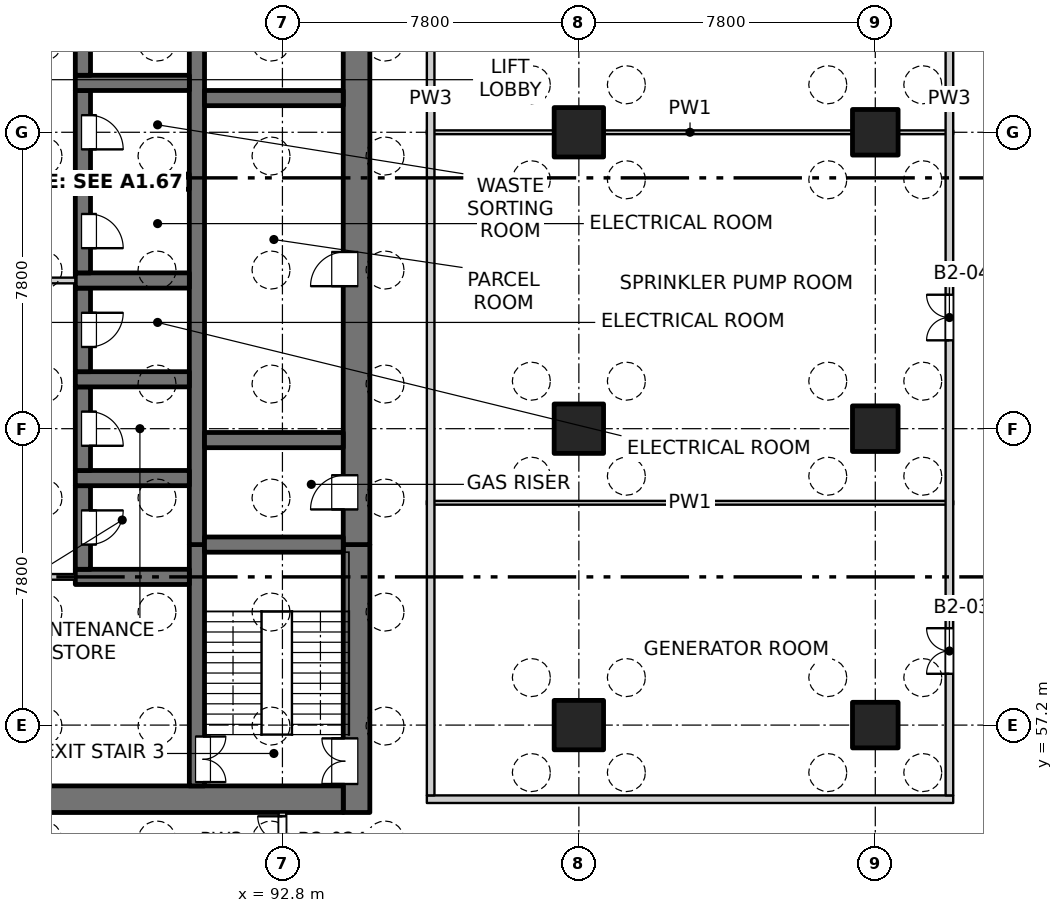
"""IFC4 building model, lengths in metres.
Left out: names, types, materials, properties, quantities, classifications, styles, units other than length and angle.
Written with IfcOpenShell. Run it as: python <this file> out.ifc"""

import sys

from ifc_helpers import new_model, si_unit, direction, frame, frame_2d, origin, origin_2d, place, context, subcontext, project, spatial, rectangle, extrude, element, fill, save


model = new_model("IFC4")
c1 = context("Model", 3, precision=1e-05, world=origin(), true_north=direction((0.0, 1.0)))
c2 = subcontext(c1, "Body", "Model", "MODEL_VIEW")
j1 = project(units=[si_unit("LENGTHUNIT", "METRE"), si_unit("PLANEANGLEUNIT", "RADIAN")], contexts=[c1])
p1 = place(None, origin())
s1 = spatial("IfcSite", under=j1, at=p1, CompositionType="ELEMENT")
p2 = place(p1, origin())
s2 = spatial("IfcBuilding", under=s1, at=p2, CompositionType="ELEMENT")
p3 = place(p2, frame((0.0, 0.0, -9.0)))
s3 = spatial("IfcBuildingStorey", under=s2, at=p3, CompositionType="ELEMENT", Elevation=-9.0)
for number, where, z_axis, x_axis in (
    (1, (108.4, 57.2, -0.5), (0.0, 0.0, 1.0), (1.0, 0.0, 0.0)),
    (2, (108.4, 65.0, -0.5), (0.0, 0.0, 1.0), (1.0, 0.0, 0.0)),
    (3, (108.4, 72.8, -0.5), (0.0, 0.0, 1.0), (1.0, 0.0, 0.0)),
):
    element("IfcColumn", number, at=place(p3, frame(where, z_axis=z_axis, x_axis=x_axis)), inside=s3, PredefinedType="COLUMN", context=c2, shape_type="SweptSolid", body=[
        extrude(rectangle(XDim=1.2, YDim=1.2, at=origin_2d()), origin(), (0.0, 0.0, 1.0), 4.65),
    ])
for number, where, z_axis, x_axis in (
    (4, (100.6, 57.2, -0.5), (0.0, 0.0, 1.0), (1.0, 0.0, 0.0)),
    (5, (100.6, 65.0, -0.5), (0.0, 0.0, 1.0), (1.0, 0.0, 0.0)),
    (6, (100.6, 72.8, -0.5), (0.0, 0.0, 1.0), (1.0, 0.0, 0.0)),
):
    element("IfcColumn", number, at=place(p3, frame(where, z_axis=z_axis, x_axis=x_axis)), inside=s3, PredefinedType="COLUMN", context=c2, shape_type="SweptSolid", body=[
        extrude(rectangle(XDim=1.3, YDim=1.3, at=origin_2d()), origin(), (0.0, 0.0, 1.0), 4.65),
    ])
p4 = place(p3, frame((94.75, 54.9, -0.5), z_axis=(0.0, 0.0, 1.0), x_axis=(0.0, 1.0, 0.0)))
e7 = element("IfcWall", 7, at=p4, inside=s3, PredefinedType="SOLIDWALL", context=c2, shape_type="SweptSolid", body=[
    extrude(rectangle(XDim=7.05, YDim=0.7, at=frame_2d((3.525, 0.0))), origin(), (0.0, 0.0, 1.0), 4.65),
])
p5 = place(p4, frame((0.75, 0.0, 0.5)))
e8 = element("IfcOpeningElement", 8, at=p5, cuts=e7, PredefinedType="OPENING", context=c2, shape_type="SweptSolid", body=[
    extrude(rectangle(XDim=1.2, YDim=2.1, at=frame_2d((0.6, 1.05))), frame((0.0, 0.36, 0.0), z_axis=(0.0, -1.0, 0.0), x_axis=(1.0, 0.0, 0.0)), (0.0, 0.0, 1.0), 0.72),
])
p6 = place(p3, frame((94.75, 61.95, -0.5), z_axis=(0.0, 0.0, 1.0), x_axis=(0.0, 1.0, 0.0)))
e9 = element("IfcWall", 9, at=p6, inside=s3, PredefinedType="SOLIDWALL", context=c2, shape_type="SweptSolid", body=[
    extrude(rectangle(XDim=15.35, YDim=0.7, at=frame_2d((7.675, 0.0))), origin(), (0.0, 0.0, 1.0), 4.65),
])
p7 = place(p6, frame((0.925, 0.0, 0.5)))
e10 = element("IfcOpeningElement", 10, at=p7, cuts=e9, PredefinedType="OPENING", context=c2, shape_type="SweptSolid", body=[
    extrude(rectangle(XDim=0.9, YDim=2.1, at=frame_2d((0.45, 1.05))), frame((0.0, 0.36, 0.0), z_axis=(0.0, -1.0, 0.0), x_axis=(1.0, 0.0, 0.0)), (0.0, 0.0, 1.0), 0.72),
])
p8 = place(p6, frame((6.8, 0.0, 0.5)))
e11 = element("IfcOpeningElement", 11, at=p8, cuts=e9, PredefinedType="OPENING", context=c2, shape_type="SweptSolid", body=[
    extrude(rectangle(XDim=0.9, YDim=2.1, at=frame_2d((0.45, 1.05))), frame((0.0, 0.36, 0.0), z_axis=(0.0, -1.0, 0.0), x_axis=(1.0, 0.0, 0.0)), (0.0, 0.0, 1.0), 0.72),
])
p9 = place(p6, frame((13.1, 0.0, 0.5)))
e12 = element("IfcOpeningElement", 12, at=p9, cuts=e9, PredefinedType="OPENING", context=c2, shape_type="SweptSolid", body=[
    extrude(rectangle(XDim=0.9, YDim=2.1, at=frame_2d((0.45, 1.05))), frame((0.0, 0.36, 0.0), z_axis=(0.0, -1.0, 0.0), x_axis=(1.0, 0.0, 0.0)), (0.0, 0.0, 1.0), 0.72),
])
p10 = place(p3, frame((75.6, 55.25, -0.5), z_axis=(0.0, 0.0, 1.0), x_axis=(1.0, 0.0, 0.0)))
e13 = element("IfcWall", 13, at=p10, inside=s3, PredefinedType="SOLIDWALL", context=c2, shape_type="SweptSolid", body=[
    extrude(rectangle(XDim=18.8, YDim=0.7, at=frame_2d((9.4, 0.0))), origin(), (0.0, 0.0, 1.0), 4.65),
])
p11 = place(p10, frame((8.65, 0.0, 0.5)))
e14 = element("IfcOpeningElement", 14, at=p11, cuts=e13, PredefinedType="OPENING", context=c2, shape_type="SweptSolid", body=[
    extrude(rectangle(XDim=1.5, YDim=2.1, at=frame_2d((0.75, 1.05))), frame((0.0, 0.36, 0.0), z_axis=(0.0, -1.0, 0.0), x_axis=(1.0, 0.0, 0.0)), (0.0, 0.0, 1.0), 0.72),
])
p12 = place(p3, frame((90.55, 55.6, -0.5), z_axis=(0.0, 0.0, 1.0), x_axis=(0.0, 1.0, 0.0)))
e15 = element("IfcWall", 15, at=p12, inside=s3, PredefinedType="SOLIDWALL", context=c2, shape_type="SweptSolid", body=[
    extrude(rectangle(XDim=6.35, YDim=0.4, at=frame_2d((3.175, 0.0))), origin(), (0.0, 0.0, 1.0), 4.65),
])
p13 = place(p12, frame((0.1, 0.0, 0.5)))
e16 = element("IfcOpeningElement", 16, at=p13, cuts=e15, PredefinedType="OPENING", context=c2, shape_type="SweptSolid", body=[
    extrude(rectangle(XDim=1.2, YDim=2.1, at=frame_2d((0.6, 1.05))), frame((0.0, 0.21, 0.0), z_axis=(0.0, -1.0, 0.0), x_axis=(1.0, 0.0, 0.0)), (0.0, 0.0, 1.0), 0.42),
])
p14 = place(p3, frame((90.55, 61.95, -0.5), z_axis=(0.0, 0.0, 1.0), x_axis=(0.0, 1.0, 0.0)))
e17 = element("IfcWall", 17, at=p14, inside=s3, PredefinedType="SOLIDWALL", context=c2, shape_type="SweptSolid", body=[
    extrude(rectangle(XDim=15.35, YDim=0.4, at=frame_2d((7.675, 0.0))), origin(), (0.0, 0.0, 1.0), 4.65),
])
p15 = place(p3, frame((87.35, 61.1, -0.5), z_axis=(0.0, 0.0, 1.0), x_axis=(1.0, 0.0, 0.0)))
e18 = element("IfcWall", 18, at=p15, inside=s3, PredefinedType="SOLIDWALL", context=c2, shape_type="SweptSolid", body=[
    extrude(rectangle(XDim=3.0, YDim=0.4, at=frame_2d((1.5, 0.0))), origin(), (0.0, 0.0, 1.0), 4.65),
])
p16 = place(p3, frame((87.55, 61.3, -0.5), z_axis=(0.0, 0.0, 1.0), x_axis=(0.0, 1.0, 0.0)))
e19 = element("IfcWall", 19, at=p16, inside=s3, PredefinedType="SOLIDWALL", context=c2, shape_type="SweptSolid", body=[
    extrude(rectangle(XDim=2.2, YDim=0.4, at=frame_2d((1.1, 0.0))), origin(), (0.0, 0.0, 1.0), 4.65),
])
p17 = place(p16, frame((0.65, 0.0, 0.5)))
e20 = element("IfcOpeningElement", 20, at=p17, cuts=e19, PredefinedType="OPENING", context=c2, shape_type="SweptSolid", body=[
    extrude(rectangle(XDim=0.9, YDim=2.1, at=frame_2d((0.45, 1.05))), frame((0.0, 0.21, 0.0), z_axis=(0.0, -1.0, 0.0), x_axis=(1.0, 0.0, 0.0)), (0.0, 0.0, 1.0), 0.42),
])
p18 = place(p3, frame((87.35, 63.7, -0.5), z_axis=(0.0, 0.0, 1.0), x_axis=(1.0, 0.0, 0.0)))
e21 = element("IfcWall", 21, at=p18, inside=s3, PredefinedType="SOLIDWALL", context=c2, shape_type="SweptSolid", body=[
    extrude(rectangle(XDim=3.0, YDim=0.4, at=frame_2d((1.5, 0.0))), origin(), (0.0, 0.0, 1.0), 4.65),
])
p19 = place(p3, frame((87.55, 63.9, -0.5), z_axis=(0.0, 0.0, 1.0), x_axis=(0.0, 1.0, 0.0)))
e22 = element("IfcWall", 22, at=p19, inside=s3, PredefinedType="SOLIDWALL", context=c2, shape_type="SweptSolid", body=[
    extrude(rectangle(XDim=2.2, YDim=0.4, at=frame_2d((1.1, 0.0))), origin(), (0.0, 0.0, 1.0), 4.65),
])
p20 = place(p19, frame((0.65, 0.0, 0.5)))
e23 = element("IfcOpeningElement", 23, at=p20, cuts=e22, PredefinedType="OPENING", context=c2, shape_type="SweptSolid", body=[
    extrude(rectangle(XDim=0.9, YDim=2.1, at=frame_2d((0.45, 1.05))), frame((0.0, 0.21, 0.0), z_axis=(0.0, -1.0, 0.0), x_axis=(1.0, 0.0, 0.0)), (0.0, 0.0, 1.0), 0.42),
])
p21 = place(p3, frame((87.35, 66.3, -0.5), z_axis=(0.0, 0.0, 1.0), x_axis=(1.0, 0.0, 0.0)))
e24 = element("IfcWall", 24, at=p21, inside=s3, PredefinedType="SOLIDWALL", context=c2, shape_type="SweptSolid", body=[
    extrude(rectangle(XDim=3.0, YDim=0.4, at=frame_2d((1.5, 0.0))), origin(), (0.0, 0.0, 1.0), 4.65),
])
p22 = place(p3, frame((87.55, 66.5, -0.5), z_axis=(0.0, 0.0, 1.0), x_axis=(0.0, 1.0, 0.0)))
e25 = element("IfcWall", 25, at=p22, inside=s3, PredefinedType="SOLIDWALL", context=c2, shape_type="SweptSolid", body=[
    extrude(rectangle(XDim=2.2, YDim=0.4, at=frame_2d((1.1, 0.0))), origin(), (0.0, 0.0, 1.0), 4.65),
])
p23 = place(p22, frame((0.65, 0.0, 0.5)))
e26 = element("IfcOpeningElement", 26, at=p23, cuts=e25, PredefinedType="OPENING", context=c2, shape_type="SweptSolid", body=[
    extrude(rectangle(XDim=0.9, YDim=2.1, at=frame_2d((0.45, 1.05))), frame((0.0, 0.21, 0.0), z_axis=(0.0, -1.0, 0.0), x_axis=(1.0, 0.0, 0.0)), (0.0, 0.0, 1.0), 0.42),
])
p24 = place(p3, frame((87.35, 68.9, -0.5), z_axis=(0.0, 0.0, 1.0), x_axis=(1.0, 0.0, 0.0)))
e27 = element("IfcWall", 27, at=p24, inside=s3, PredefinedType="SOLIDWALL", context=c2, shape_type="SweptSolid", body=[
    extrude(rectangle(XDim=3.0, YDim=0.4, at=frame_2d((1.5, 0.0))), origin(), (0.0, 0.0, 1.0), 4.65),
])
p25 = place(p3, frame((87.55, 69.1, -0.5), z_axis=(0.0, 0.0, 1.0), x_axis=(0.0, 1.0, 0.0)))
e28 = element("IfcWall", 28, at=p25, inside=s3, PredefinedType="SOLIDWALL", context=c2, shape_type="SweptSolid", body=[
    extrude(rectangle(XDim=2.2, YDim=0.4, at=frame_2d((1.1, 0.0))), origin(), (0.0, 0.0, 1.0), 4.65),
])
p26 = place(p25, frame((0.65, 0.0, 0.5)))
e29 = element("IfcOpeningElement", 29, at=p26, cuts=e28, PredefinedType="OPENING", context=c2, shape_type="SweptSolid", body=[
    extrude(rectangle(XDim=0.9, YDim=2.1, at=frame_2d((0.45, 1.05))), frame((0.0, 0.21, 0.0), z_axis=(0.0, -1.0, 0.0), x_axis=(1.0, 0.0, 0.0)), (0.0, 0.0, 1.0), 0.42),
])
p27 = place(p3, frame((87.35, 71.5, -0.5), z_axis=(0.0, 0.0, 1.0), x_axis=(1.0, 0.0, 0.0)))
e30 = element("IfcWall", 30, at=p27, inside=s3, PredefinedType="SOLIDWALL", context=c2, shape_type="SweptSolid", body=[
    extrude(rectangle(XDim=3.0, YDim=0.4, at=frame_2d((1.5, 0.0))), origin(), (0.0, 0.0, 1.0), 4.65),
])
p28 = place(p3, frame((87.55, 71.7, -0.5), z_axis=(0.0, 0.0, 1.0), x_axis=(0.0, 1.0, 0.0)))
e31 = element("IfcWall", 31, at=p28, inside=s3, PredefinedType="SOLIDWALL", context=c2, shape_type="SweptSolid", body=[
    extrude(rectangle(XDim=2.2, YDim=0.4, at=frame_2d((1.1, 0.0))), origin(), (0.0, 0.0, 1.0), 4.65),
])
p29 = place(p28, frame((0.65, 0.0, 0.5)))
e32 = element("IfcOpeningElement", 32, at=p29, cuts=e31, PredefinedType="OPENING", context=c2, shape_type="SweptSolid", body=[
    extrude(rectangle(XDim=0.9, YDim=2.1, at=frame_2d((0.45, 1.05))), frame((0.0, 0.21, 0.0), z_axis=(0.0, -1.0, 0.0), x_axis=(1.0, 0.0, 0.0)), (0.0, 0.0, 1.0), 0.42),
])
p30 = place(p3, frame((87.35, 74.1, -0.5), z_axis=(0.0, 0.0, 1.0), x_axis=(1.0, 0.0, 0.0)))
e33 = element("IfcWall", 33, at=p30, inside=s3, PredefinedType="SOLIDWALL", context=c2, shape_type="SweptSolid", body=[
    extrude(rectangle(XDim=3.0, YDim=0.4, at=frame_2d((1.5, 0.0))), origin(), (0.0, 0.0, 1.0), 4.65),
])
p31 = place(p3, frame((87.55, 74.3, -0.5), z_axis=(0.0, 0.0, 1.0), x_axis=(0.0, 1.0, 0.0)))
e34 = element("IfcWall", 34, at=p31, inside=s3, PredefinedType="SOLIDWALL", context=c2, shape_type="SweptSolid", body=[
    extrude(rectangle(XDim=2.2, YDim=0.4, at=frame_2d((1.1, 0.0))), origin(), (0.0, 0.0, 1.0), 4.65),
])
p32 = place(p31, frame((0.65, 0.0, 0.5)))
e35 = element("IfcOpeningElement", 35, at=p32, cuts=e34, PredefinedType="OPENING", context=c2, shape_type="SweptSolid", body=[
    extrude(rectangle(XDim=0.9, YDim=2.1, at=frame_2d((0.45, 1.05))), frame((0.0, 0.21, 0.0), z_axis=(0.0, -1.0, 0.0), x_axis=(1.0, 0.0, 0.0)), (0.0, 0.0, 1.0), 0.42),
])
for number, where, z_axis, x_axis in (
    (36, (90.75, 61.95, -0.5), (0.0, 0.0, 1.0), (1.0, 0.0, 0.0)),
    (37, (90.75, 64.7, -0.5), (0.0, 0.0, 1.0), (1.0, 0.0, 0.0)),
    (38, (90.75, 73.7, -0.5), (0.0, 0.0, 1.0), (1.0, 0.0, 0.0)),
):
    element("IfcWall", number, at=place(p3, frame(where, z_axis=z_axis, x_axis=x_axis)), inside=s3, PredefinedType="SOLIDWALL", context=c2, shape_type="SweptSolid", body=[
        extrude(rectangle(XDim=3.65, YDim=0.4, at=frame_2d((1.825, 0.0))), origin(), (0.0, 0.0, 1.0), 4.65),
    ])
p33 = place(p3, frame((96.6, 55.25, 0.0), z_axis=(0.0, 0.0, 1.0), x_axis=(1.0, 0.0, 0.0)))
e39 = element("IfcWall", 39, at=p33, inside=s3, PredefinedType="PARTITIONING", context=c2, shape_type="SweptSolid", body=[
    extrude(rectangle(XDim=13.85, YDim=0.2, at=frame_2d((6.925, 0.0))), origin(), (0.0, 0.0, 1.0), 4.15),
])
p34 = place(p3, frame((82.65, 61.1, 0.0), z_axis=(0.0, 0.0, 1.0), x_axis=(1.0, 0.0, 0.0)))
e40 = element("IfcWall", 40, at=p34, inside=s3, PredefinedType="PARTITIONING", context=c2, shape_type="SweptSolid", body=[
    extrude(rectangle(XDim=4.7, YDim=0.15, at=frame_2d((2.35, 0.0))), origin(), (0.0, 0.0, 1.0), 4.15),
])
p35 = place(p34, frame((1.45, 0.0, 0.0)))
e41 = element("IfcOpeningElement", 41, at=p35, cuts=e40, PredefinedType="OPENING", context=c2, shape_type="SweptSolid", body=[
    extrude(rectangle(XDim=1.8, YDim=2.1, at=frame_2d((0.9, 1.05))), frame((0.0, 0.085, 0.0), z_axis=(0.0, -1.0, 0.0), x_axis=(1.0, 0.0, 0.0)), (0.0, 0.0, 1.0), 0.17),
])
p36 = place(p3, frame((96.6, 63.05, 0.0), z_axis=(0.0, 0.0, 1.0), x_axis=(1.0, 0.0, 0.0)))
e42 = element("IfcWall", 42, at=p36, inside=s3, PredefinedType="PARTITIONING", context=c2, shape_type="SweptSolid", body=[
    extrude(rectangle(XDim=13.85, YDim=0.1, at=frame_2d((6.925, 0.0))), origin(), (0.0, 0.0, 1.0), 4.15),
])
p37 = place(p3, frame((82.65, 68.9, 0.0), z_axis=(0.0, 0.0, 1.0), x_axis=(1.0, 0.0, 0.0)))
e43 = element("IfcWall", 43, at=p37, inside=s3, PredefinedType="PARTITIONING", context=c2, shape_type="SweptSolid", body=[
    extrude(rectangle(XDim=4.7, YDim=0.15, at=frame_2d((2.35, 0.0))), origin(), (0.0, 0.0, 1.0), 4.15),
])
p38 = place(p37, frame((1.45, 0.0, 0.0)))
e44 = element("IfcOpeningElement", 44, at=p38, cuts=e43, PredefinedType="OPENING", context=c2, shape_type="SweptSolid", body=[
    extrude(rectangle(XDim=1.8, YDim=2.1, at=frame_2d((0.9, 1.05))), frame((0.0, 0.085, 0.0), z_axis=(0.0, -1.0, 0.0), x_axis=(1.0, 0.0, 0.0)), (0.0, 0.0, 1.0), 0.17),
])
p39 = place(p3, frame((96.6, 72.8, 0.0), z_axis=(0.0, 0.0, 1.0), x_axis=(1.0, 0.0, 0.0)))
e45 = element("IfcWall", 45, at=p39, inside=s3, PredefinedType="PARTITIONING", context=c2, shape_type="SweptSolid", body=[
    extrude(rectangle(XDim=13.85, YDim=0.1, at=frame_2d((6.925, 0.0))), origin(), (0.0, 0.0, 1.0), 4.15),
])
p40 = place(p3, frame((92.8, 53.4, 0.0), z_axis=(0.0, 0.0, 1.0), x_axis=(0.0, 1.0, 0.0)))
e46 = element("IfcWall", 46, at=p40, inside=s3, PredefinedType="PARTITIONING", context=c2, shape_type="SweptSolid", body=[
    extrude(rectangle(XDim=1.5, YDim=0.2, at=frame_2d((0.75, 0.0))), origin(), (0.0, 0.0, 1.0), 4.15),
])
p41 = place(p40, frame((0.1, 0.0, 0.0)))
e47 = element("IfcOpeningElement", 47, at=p41, cuts=e46, PredefinedType="OPENING", context=c2, shape_type="SweptSolid", body=[
    extrude(rectangle(XDim=1.3, YDim=2.1, at=frame_2d((0.65, 1.05))), frame((0.0, 0.11, 0.0), z_axis=(0.0, -1.0, 0.0), x_axis=(1.0, 0.0, 0.0)), (0.0, 0.0, 1.0), 0.22),
])
p42 = place(p3, frame((96.7, 55.35, 0.0), z_axis=(0.0, 0.0, 1.0), x_axis=(0.0, 1.0, 0.0)))
e48 = element("IfcWall", 48, at=p42, inside=s3, PredefinedType="PARTITIONING", context=c2, shape_type="SweptSolid", body=[
    extrude(rectangle(XDim=36.65, YDim=0.2, at=frame_2d((18.325, 0.0))), origin(), (0.0, 0.0, 1.0), 4.15),
])
p43 = place(p3, frame((110.35, 55.35, 0.0), z_axis=(0.0, 0.0, 1.0), x_axis=(0.0, 1.0, 0.0)))
e49 = element("IfcWall", 49, at=p43, inside=s3, PredefinedType="PARTITIONING", context=c2, shape_type="SweptSolid", body=[
    extrude(rectangle(XDim=36.65, YDim=0.2, at=frame_2d((18.325, 0.0))), origin(), (0.0, 0.0, 1.0), 4.15),
])
p44 = place(p43, frame((3.2, 0.0, 0.0)))
e50 = element("IfcOpeningElement", 50, at=p44, cuts=e49, PredefinedType="OPENING", context=c2, shape_type="SweptSolid", body=[
    extrude(rectangle(XDim=1.2, YDim=2.1, at=frame_2d((0.6, 1.05))), frame((0.0, 0.11, 0.0), z_axis=(0.0, -1.0, 0.0), x_axis=(1.0, 0.0, 0.0)), (0.0, 0.0, 1.0), 0.22),
])
p45 = place(p43, frame((11.975, 0.0, 0.0)))
e51 = element("IfcOpeningElement", 51, at=p45, cuts=e49, PredefinedType="OPENING", context=c2, shape_type="SweptSolid", body=[
    extrude(rectangle(XDim=1.2, YDim=2.1, at=frame_2d((0.6, 1.05))), frame((0.0, 0.11, 0.0), z_axis=(0.0, -1.0, 0.0), x_axis=(1.0, 0.0, 0.0)), (0.0, 0.0, 1.0), 0.22),
])
p46 = place(p43, frame((20.75, 0.0, 0.0)))
e52 = element("IfcOpeningElement", 52, at=p46, cuts=e49, PredefinedType="OPENING", context=c2, shape_type="SweptSolid", body=[
    extrude(rectangle(XDim=1.2, YDim=2.1, at=frame_2d((0.6, 1.05))), frame((0.0, 0.11, 0.0), z_axis=(0.0, -1.0, 0.0), x_axis=(1.0, 0.0, 0.0)), (0.0, 0.0, 1.0), 0.22),
])
p47 = place(p43, frame((30.5, 0.0, 0.0)))
e53 = element("IfcOpeningElement", 53, at=p47, cuts=e49, PredefinedType="OPENING", context=c2, shape_type="SweptSolid", body=[
    extrude(rectangle(XDim=1.2, YDim=2.1, at=frame_2d((0.6, 1.05))), frame((0.0, 0.11, 0.0), z_axis=(0.0, -1.0, 0.0), x_axis=(1.0, 0.0, 0.0)), (0.0, 0.0, 1.0), 0.22),
])
p48 = place(p41, origin())
e54 = element("IfcDoor", 54, at=p48, inside=s3, OperationType="DOUBLE_DOOR_SINGLE_SWING", PredefinedType="DOOR", context=c2, shape_type="SweptSolid", body=[
    extrude(rectangle(XDim=1.3, YDim=2.1, at=frame_2d((0.65, 1.05))), frame((0.0, 0.025, 0.0), z_axis=(0.0, -1.0, 0.0), x_axis=(1.0, 0.0, 0.0)), (0.0, 0.0, 1.0), 0.05),
])
fill(e47, e54)
p49 = place(p13, origin())
e55 = element("IfcDoor", 55, at=p49, inside=s3, OperationType="DOUBLE_DOOR_SINGLE_SWING", PredefinedType="DOOR", context=c2, shape_type="SweptSolid", body=[
    extrude(rectangle(XDim=1.2, YDim=2.1, at=frame_2d((0.6, 1.05))), frame((0.0, -0.135, 0.0), z_axis=(0.0, -1.0, 0.0), x_axis=(1.0, 0.0, 0.0)), (0.0, 0.0, 1.0), 0.05),
])
fill(e16, e55)
p50 = place(p5, origin())
e56 = element("IfcDoor", 56, at=p50, inside=s3, OperationType="DOUBLE_DOOR_SINGLE_SWING", PredefinedType="DOOR", context=c2, shape_type="SweptSolid", body=[
    extrude(rectangle(XDim=1.2, YDim=2.1, at=frame_2d((0.6, 1.05))), frame((0.0, 0.335, 0.0), z_axis=(0.0, -1.0, 0.0), x_axis=(1.0, 0.0, 0.0)), (0.0, 0.0, 1.0), 0.05),
])
fill(e8, e56)
p51 = place(p44, origin())
e57 = element("IfcDoor", 57, at=p51, inside=s3, OperationType="DOUBLE_DOOR_SINGLE_SWING", PredefinedType="DOOR", context=c2, shape_type="SweptSolid", body=[
    extrude(rectangle(XDim=1.2, YDim=2.1, at=frame_2d((0.6, 1.05))), frame((0.0, 0.025, 0.0), z_axis=(0.0, -1.0, 0.0), x_axis=(1.0, 0.0, 0.0)), (0.0, 0.0, 1.0), 0.05),
])
fill(e50, e57)
p52 = place(p17, origin())
e58 = element("IfcDoor", 58, at=p52, inside=s3, OperationType="SINGLE_SWING_LEFT", PredefinedType="DOOR", context=c2, shape_type="SweptSolid", body=[
    extrude(rectangle(XDim=0.9, YDim=2.1, at=frame_2d((0.45, 1.05))), frame((0.0, -0.135, 0.0), z_axis=(0.0, -1.0, 0.0), x_axis=(1.0, 0.0, 0.0)), (0.0, 0.0, 1.0), 0.05),
])
fill(e20, e58)
p53 = place(p7, origin())
e59 = element("IfcDoor", 59, at=p53, inside=s3, OperationType="SINGLE_SWING_LEFT", PredefinedType="DOOR", context=c2, shape_type="SweptSolid", body=[
    extrude(rectangle(XDim=0.9, YDim=2.1, at=frame_2d((0.45, 1.05))), frame((0.0, 0.335, 0.0), z_axis=(0.0, -1.0, 0.0), x_axis=(1.0, 0.0, 0.0)), (0.0, 0.0, 1.0), 0.05),
])
fill(e10, e59)
p54 = place(p20, origin())
e60 = element("IfcDoor", 60, at=p54, inside=s3, OperationType="SINGLE_SWING_RIGHT", PredefinedType="DOOR", context=c2, shape_type="SweptSolid", body=[
    extrude(rectangle(XDim=0.9, YDim=2.1, at=frame_2d((0.45, 1.05))), frame((0.0, -0.135, 0.0), z_axis=(0.0, -1.0, 0.0), x_axis=(1.0, 0.0, 0.0)), (0.0, 0.0, 1.0), 0.05),
])
fill(e23, e60)
p55 = place(p23, origin())
e61 = element("IfcDoor", 61, at=p55, inside=s3, OperationType="SINGLE_SWING_LEFT", PredefinedType="DOOR", context=c2, shape_type="SweptSolid", body=[
    extrude(rectangle(XDim=0.9, YDim=2.1, at=frame_2d((0.45, 1.05))), frame((0.0, -0.135, 0.0), z_axis=(0.0, -1.0, 0.0), x_axis=(1.0, 0.0, 0.0)), (0.0, 0.0, 1.0), 0.05),
])
fill(e26, e61)
p56 = place(p45, origin())
e62 = element("IfcDoor", 62, at=p56, inside=s3, OperationType="DOUBLE_DOOR_SINGLE_SWING", PredefinedType="DOOR", context=c2, shape_type="SweptSolid", body=[
    extrude(rectangle(XDim=1.2, YDim=2.1, at=frame_2d((0.6, 1.05))), frame((0.0, 0.025, 0.0), z_axis=(0.0, -1.0, 0.0), x_axis=(1.0, 0.0, 0.0)), (0.0, 0.0, 1.0), 0.05),
])
fill(e51, e62)
p57 = place(p8, origin())
e63 = element("IfcDoor", 63, at=p57, inside=s3, OperationType="SINGLE_SWING_LEFT", PredefinedType="DOOR", context=c2, shape_type="SweptSolid", body=[
    extrude(rectangle(XDim=0.9, YDim=2.1, at=frame_2d((0.45, 1.05))), frame((0.0, 0.335, 0.0), z_axis=(0.0, -1.0, 0.0), x_axis=(1.0, 0.0, 0.0)), (0.0, 0.0, 1.0), 0.05),
])
fill(e11, e63)
p58 = place(p26, origin())
e64 = element("IfcDoor", 64, at=p58, inside=s3, OperationType="SINGLE_SWING_RIGHT", PredefinedType="DOOR", context=c2, shape_type="SweptSolid", body=[
    extrude(rectangle(XDim=0.9, YDim=2.1, at=frame_2d((0.45, 1.05))), frame((0.0, -0.135, 0.0), z_axis=(0.0, -1.0, 0.0), x_axis=(1.0, 0.0, 0.0)), (0.0, 0.0, 1.0), 0.05),
])
fill(e29, e64)
p59 = place(p29, origin())
e65 = element("IfcDoor", 65, at=p59, inside=s3, OperationType="SINGLE_SWING_RIGHT", PredefinedType="DOOR", context=c2, shape_type="SweptSolid", body=[
    extrude(rectangle(XDim=0.9, YDim=2.1, at=frame_2d((0.45, 1.05))), frame((0.0, -0.135, 0.0), z_axis=(0.0, -1.0, 0.0), x_axis=(1.0, 0.0, 0.0)), (0.0, 0.0, 1.0), 0.05),
])
fill(e32, e65)
save(model, sys.argv[1])
